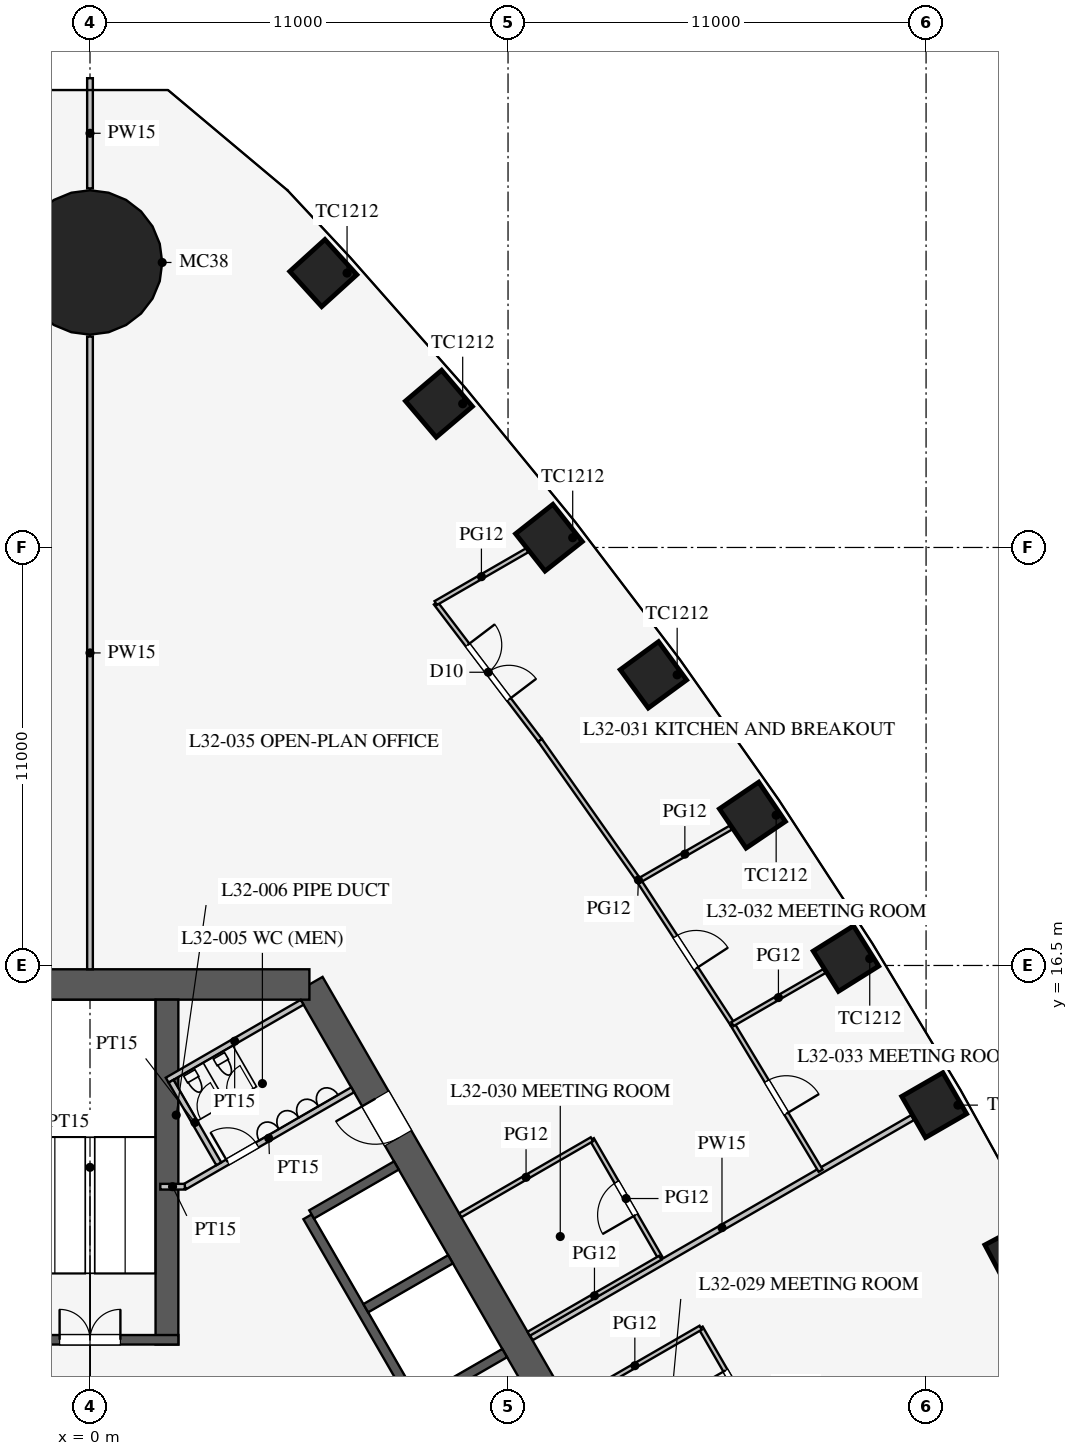
"""IFC4 building model, lengths in metres.
Left out: names, types, materials, properties, quantities, classifications, styles, units other than length and angle.
Written with IfcOpenShell. Run it as: python <this file> out.ifc"""

import sys

from ifc_helpers import new_model, si_unit, direction, frame, frame_2d, origin, origin_2d, place, context, subcontext, project, spatial, rectangle, circle, extrude, element, fill, save


model = new_model("IFC4")
c1 = context("Model", 3, precision=1e-05, world=origin(), true_north=direction((0.0, 1.0)))
c2 = subcontext(c1, "Body", "Model", "MODEL_VIEW")
j1 = project(units=[si_unit("LENGTHUNIT", "METRE"), si_unit("PLANEANGLEUNIT", "RADIAN")], contexts=[c1])
p1 = place(None, origin())
s1 = spatial("IfcSite", under=j1, at=p1, CompositionType="ELEMENT")
p2 = place(p1, origin())
s2 = spatial("IfcBuilding", under=s1, at=p2, CompositionType="ELEMENT")
p3 = place(p2, frame((0.0, 0.0, 140.9)))
s3 = spatial("IfcBuildingStorey", under=s2, at=p3, CompositionType="ELEMENT", Elevation=140.9)
for number, where, z_axis, x_axis in (
    (1, (24.393, 8.887, 0.0), (0.0, 0.0, 1.0), (-0.468, 0.883, 0.0)),
    (2, (22.213, 12.825, 0.0), (0.0, 0.0, 1.0), (-0.5, 0.866, 0.0)),
    (3, (19.893, 16.681, 0.0), (0.0, 0.0, 1.0), (-0.531, 0.847, 0.0)),
    (4, (17.43, 20.456, 0.0), (0.0, 0.0, 1.0), (-0.561, 0.828, 0.0)),
    (5, (14.825, 24.148, 0.0), (0.0, 0.0, 1.0), (-0.591, 0.807, 0.0)),
    (6, (12.077, 27.757, 0.0), (0.0, 0.0, 1.0), (-0.62, 0.785, 0.0)),
    (7, (9.182, 31.282, 0.0), (0.0, 0.0, 1.0), (-0.648, 0.762, 0.0)),
    (8, (6.139, 34.721, 0.0), (0.0, 0.0, 1.0), (-0.672, 0.74, 0.0)),
):
    element("IfcColumn", number, at=place(p3, frame(where, z_axis=z_axis, x_axis=x_axis)), inside=s3, PredefinedType="COLUMN", context=c2, shape_type="SweptSolid", body=[
        extrude(rectangle(XDim=1.25, YDim=1.25, at=origin_2d()), origin(), (0.0, 0.0, 1.0), 4.2),
    ])
p4 = place(p3, frame((0.0, 35.0, 0.0), z_axis=(0.0, 0.0, 1.0), x_axis=(1.0, 0.0, 0.0)))
e9 = element("IfcColumn", 9, at=p4, inside=s3, PredefinedType="COLUMN", context=c2, shape_type="SweptSolid", body=[
    extrude(circle(Radius=1.9, at=origin_2d()), origin(), (0.0, 0.0, 1.0), 4.2),
])
p5 = place(p3, frame((16.743, -3.0, 0.0), z_axis=(0.0, 0.0, 1.0), x_axis=(-0.500002442456, 0.866023993627, 0.0)))
e10 = element("IfcWall", 10, at=p5, inside=s3, PredefinedType="SHEAR", context=c2, shape_type="SweptSolid", body=[
    extrude(rectangle(XDim=21.939, YDim=0.8, at=frame_2d((10.97, 0.0))), origin(), (0.0, 0.0, 1.0), 4.2),
])
p6 = place(p5, frame((17.27, 0.0, 0.0)))
e11 = element("IfcOpeningElement", 11, at=p6, cuts=e10, PredefinedType="OPENING", context=c2, shape_type="SweptSolid", body=[
    extrude(rectangle(XDim=1.2, YDim=2.1, at=frame_2d((0.6, 1.05))), frame((0.0, 0.41, 0.0), z_axis=(0.0, -1.0, 0.0), x_axis=(1.0, 0.0, 0.0)), (0.0, 0.0, 1.0), 0.82),
])
p7 = place(p5, frame((3.47, 0.0, 0.0)))
e12 = element("IfcOpeningElement", 12, at=p7, cuts=e10, PredefinedType="OPENING", context=c2, shape_type="SweptSolid", body=[
    extrude(rectangle(XDim=1.2, YDim=2.1, at=frame_2d((0.6, 1.05))), frame((0.0, 0.41, 0.0), z_axis=(0.0, -1.0, 0.0), x_axis=(1.0, 0.0, 0.0)), (0.0, 0.0, 1.0), 0.82),
])
p8 = place(p3, frame((5.773, 16.0, 0.0), z_axis=(0.0, 0.0, 1.0), x_axis=(-1.0, 0.0, 0.0)))
e13 = element("IfcWall", 13, at=p8, inside=s3, PredefinedType="SHEAR", context=c2, shape_type="SweptSolid", body=[
    extrude(rectangle(XDim=11.547, YDim=0.8, at=frame_2d((5.773, 0.0))), origin(), (0.0, 0.0, 1.0), 4.2),
])
p9 = place(p3, frame((11.424, 0.014, 0.0), z_axis=(0.0, 0.0, 1.0), x_axis=(-0.500001763848, 0.866024385424, 0.0)))
e14 = element("IfcWall", 14, at=p9, inside=s3, PredefinedType="SHEAR", context=c2, shape_type="SweptSolid", body=[
    extrude(rectangle(XDim=11.4, YDim=0.25, at=frame_2d((5.7, 0.0))), origin(), (0.0, 0.0, 1.0), 4.2),
])
p10 = place(p9, frame((0.975, 0.0, 0.0)))
e15 = element("IfcOpeningElement", 15, at=p10, cuts=e14, PredefinedType="OPENING", context=c2, shape_type="SweptSolid", body=[
    extrude(rectangle(XDim=0.9, YDim=2.1, at=frame_2d((0.45, 1.05))), frame((0.0, 0.135, 0.0), z_axis=(0.0, -1.0, 0.0), x_axis=(1.0, 0.0, 0.0)), (0.0, 0.0, 1.0), 0.27),
])
p11 = place(p9, frame((3.825, 0.0, 0.0)))
e16 = element("IfcOpeningElement", 16, at=p11, cuts=e14, PredefinedType="OPENING", context=c2, shape_type="SweptSolid", body=[
    extrude(rectangle(XDim=0.9, YDim=2.1, at=frame_2d((0.45, 1.05))), frame((0.0, 0.135, 0.0), z_axis=(0.0, -1.0, 0.0), x_axis=(1.0, 0.0, 0.0)), (0.0, 0.0, 1.0), 0.27),
])
for number, where, z_axis, x_axis in (
    (17, (8.682, 5.012, 0.0), (0.0, 0.0, 1.0), (0.866, 0.5, 0.0)),
    (18, (7.257, 7.481, 0.0), (0.0, 0.0, 1.0), (0.866, 0.5, 0.0)),
):
    element("IfcWall", number, at=place(p3, frame(where, z_axis=z_axis, x_axis=x_axis)), inside=s3, PredefinedType="SHEAR", context=c2, shape_type="SweptSolid", body=[
        extrude(rectangle(XDim=2.575, YDim=0.25, at=frame_2d((1.288, 0.0))), origin(), (0.0, 0.0, 1.0), 4.2),
    ])
p12 = place(p3, frame((5.832, 9.949, 0.0), z_axis=(0.0, 0.0, 1.0), x_axis=(0.866029291668, 0.499993265928, 0.0)))
e19 = element("IfcWall", 19, at=p12, inside=s3, PredefinedType="SHEAR", context=c2, shape_type="SweptSolid", body=[
    extrude(rectangle(XDim=2.575, YDim=0.25, at=frame_2d((1.288, 0.0))), origin(), (0.0, 0.0, 1.0), 4.2),
])
p13 = place(p3, frame((2.025, 6.525, 0.0), z_axis=(0.0, 0.0, 1.0), x_axis=(0.0, 1.0, 0.0)))
e20 = element("IfcWall", 20, at=p13, inside=s3, PredefinedType="SHEAR", context=c2, shape_type="SweptSolid", body=[
    extrude(rectangle(XDim=9.075, YDim=0.6, at=frame_2d((4.538, 0.0))), origin(), (0.0, 0.0, 1.0), 4.2),
])
p14 = place(p3, frame((2.325, 6.65, 0.0), z_axis=(0.0, 0.0, 1.0), x_axis=(-1.0, 0.0, 0.0)))
e21 = element("IfcWall", 21, at=p14, inside=s3, PredefinedType="SHEAR", context=c2, shape_type="SweptSolid", body=[
    extrude(rectangle(XDim=4.65, YDim=0.25, at=frame_2d((2.325, 0.0))), origin(), (0.0, 0.0, 1.0), 4.2),
])
p15 = place(p14, frame((1.525, 0.0, 0.0)))
e22 = element("IfcOpeningElement", 22, at=p15, cuts=e21, PredefinedType="OPENING", context=c2, shape_type="SweptSolid", body=[
    extrude(rectangle(XDim=1.6, YDim=2.1, at=frame_2d((0.8, 1.05))), frame((0.0, 0.135, 0.0), z_axis=(0.0, -1.0, 0.0), x_axis=(1.0, 0.0, 0.0)), (0.0, 0.0, 1.0), 0.27),
])
p16 = place(p3, frame((2.495, 10.678, 0.0), z_axis=(0.0, 0.0, 1.0), x_axis=(0.86602216432, 0.500005610874, 0.0)))
e23 = element("IfcWall", 23, at=p16, inside=s3, PredefinedType="PARTITIONING", context=c2, shape_type="SweptSolid", body=[
    extrude(rectangle(XDim=5.1, YDim=0.15, at=frame_2d((2.55, 0.0))), origin(), (0.0, 0.0, 1.0), 4.0),
])
p17 = place(p16, frame((1.3, 0.0, 0.0)))
e24 = element("IfcOpeningElement", 24, at=p17, cuts=e23, PredefinedType="OPENING", context=c2, shape_type="SweptSolid", body=[
    extrude(rectangle(XDim=0.9, YDim=2.1, at=frame_2d((0.45, 1.05))), frame((0.0, 0.085, 0.0), z_axis=(0.0, -1.0, 0.0), x_axis=(1.0, 0.0, 0.0)), (0.0, 0.0, 1.0), 0.17),
])
p18 = place(p3, frame((2.495, 10.678, 0.0), z_axis=(0.0, 0.0, 1.0), x_axis=(-1.0, 0.0, 0.0)))
e25 = element("IfcWall", 25, at=p18, inside=s3, PredefinedType="PARTITIONING", context=c2, shape_type="SweptSolid", body=[
    extrude(rectangle(XDim=0.645, YDim=0.15, at=frame_2d((0.323, 0.0))), origin(), (0.0, 0.0, 1.0), 4.0),
])
p19 = place(p3, frame((2.031, 13.482, 0.0), z_axis=(0.0, 0.0, 1.0), x_axis=(0.866050731258, 0.499956128963, 0.0)))
e26 = element("IfcWall", 26, at=p19, inside=s3, PredefinedType="PARTITIONING", context=c2, shape_type="SweptSolid", body=[
    extrude(rectangle(XDim=4.1, YDim=0.15, at=frame_2d((2.05, 0.0))), origin(), (0.0, 0.0, 1.0), 4.0),
])
p20 = place(p3, frame((3.389, 11.281, 0.0), z_axis=(0.0, 0.0, 1.0), x_axis=(-0.499989096993, 0.866031698547, 0.0)))
e27 = element("IfcWall", 27, at=p20, inside=s3, PredefinedType="PARTITIONING", context=c2, shape_type="SweptSolid", body=[
    extrude(rectangle(XDim=2.51, YDim=0.15, at=frame_2d((1.255, 0.0))), origin(), (0.0, 0.0, 1.0), 4.0),
])
p21 = place(p3, frame((0.0, 16.4, 0.0), z_axis=(0.0, 0.0, 1.0), x_axis=(0.0, 1.0, 0.0)))
e28 = element("IfcWall", 28, at=p21, inside=s3, PredefinedType="PARTITIONING", context=c2, shape_type="SweptSolid", body=[
    extrude(rectangle(XDim=16.65, YDim=0.15, at=frame_2d((8.325, 0.0))), origin(), (0.0, 0.0, 1.0), 2.3),
])
p22 = place(p3, frame((0.0, 36.95, 0.0), z_axis=(0.0, 0.0, 1.0), x_axis=(0.0, 1.0, 0.0)))
e29 = element("IfcWall", 29, at=p22, inside=s3, PredefinedType="PARTITIONING", context=c2, shape_type="SweptSolid", body=[
    extrude(rectangle(XDim=2.899, YDim=0.15, at=frame_2d((1.45, 0.0))), origin(), (0.0, 0.0, 1.0), 2.3),
])
p23 = place(p3, frame((11.613, 6.705, 0.0), z_axis=(0.0, 0.0, 1.0), x_axis=(0.866031170684, 0.499990011303, 0.0)))
e30 = element("IfcWall", 30, at=p23, inside=s3, PredefinedType="PARTITIONING", context=c2, shape_type="SweptSolid", body=[
    extrude(rectangle(XDim=11.585, YDim=0.15, at=frame_2d((5.792, 0.0))), origin(), (0.0, 0.0, 1.0), 3.2),
])
p24 = place(p3, frame((15.006, 8.808, 0.0), z_axis=(0.0, 0.0, 1.0), x_axis=(-0.500012057535, 0.866018442252, 0.0)))
e31 = element("IfcWall", 31, at=p24, inside=s3, PredefinedType="PARTITIONING", context=c2, shape_type="SweptSolid", body=[
    extrude(rectangle(XDim=3.6, YDim=0.12, at=frame_2d((1.8, 0.0))), origin(), (0.0, 0.0, 1.0), 2.9),
])
p25 = place(p24, frame((1.3, 0.0, 0.15)))
e32 = element("IfcOpeningElement", 32, at=p25, cuts=e31, PredefinedType="OPENING", context=c2, shape_type="SweptSolid", body=[
    extrude(rectangle(XDim=1.0, YDim=2.1, at=frame_2d((0.5, 1.05))), frame((0.0, 0.07, 0.0), z_axis=(0.0, -1.0, 0.0), x_axis=(1.0, 0.0, 0.0)), (0.0, 0.0, 1.0), 0.14),
])
p26 = place(p3, frame((17.869, 3.85, 0.0), z_axis=(0.0, 0.0, 1.0), x_axis=(-0.500012057535, 0.866018442252, 0.0)))
e33 = element("IfcWall", 33, at=p26, inside=s3, PredefinedType="PARTITIONING", context=c2, shape_type="SweptSolid", body=[
    extrude(rectangle(XDim=3.6, YDim=0.12, at=frame_2d((1.8, 0.0))), origin(), (0.0, 0.0, 1.0), 2.9),
])
p27 = place(p26, frame((1.3, 0.0, 0.15)))
e34 = element("IfcOpeningElement", 34, at=p27, cuts=e33, PredefinedType="OPENING", context=c2, shape_type="SweptSolid", body=[
    extrude(rectangle(XDim=1.0, YDim=2.1, at=frame_2d((0.5, 1.05))), frame((0.0, 0.07, 0.0), z_axis=(0.0, -1.0, 0.0), x_axis=(1.0, 0.0, 0.0)), (0.0, 0.0, 1.0), 0.14),
])
for number, where, z_axis, x_axis in (
    (35, (11.542, 6.808, 0.0), (0.0, 0.0, 1.0), (0.866, 0.5, 0.0)),
    (36, (9.742, 9.926, 0.0), (0.0, 0.0, 1.0), (0.866, 0.5, 0.0)),
    (37, (12.605, 4.968, 0.0), (0.0, 0.0, 1.0), (0.866, 0.5, 0.0)),
):
    element("IfcWall", number, at=place(p3, frame(where, z_axis=z_axis, x_axis=x_axis)), inside=s3, PredefinedType="PARTITIONING", context=c2, shape_type="SweptSolid", body=[
        extrude(rectangle(XDim=4.0, YDim=0.12, at=frame_2d((2.0, 0.0))), origin(), (0.0, 0.0, 1.0), 2.9),
    ])
p28 = place(p3, frame((19.226, 11.1, 0.0), z_axis=(0.0, 0.0, 1.0), x_axis=(-0.515548366618, 0.856860479703, 0.0)))
e38 = element("IfcWall", 38, at=p28, inside=s3, PredefinedType="PARTITIONING", context=c2, shape_type="SweptSolid", body=[
    extrude(rectangle(XDim=4.501, YDim=0.12, at=frame_2d((2.25, 0.0))), origin(), (0.0, 0.0, 1.0), 2.9),
])
p29 = place(p28, frame((1.75, 0.0, 0.15)))
e39 = element("IfcOpeningElement", 39, at=p29, cuts=e38, PredefinedType="OPENING", context=c2, shape_type="SweptSolid", body=[
    extrude(rectangle(XDim=1.0, YDim=2.1, at=frame_2d((0.5, 1.05))), frame((0.0, 0.07, 0.0), z_axis=(0.0, -1.0, 0.0), x_axis=(1.0, 0.0, 0.0)), (0.0, 0.0, 1.0), 0.14),
])
p30 = place(p3, frame((11.842, 22.425, 0.0), z_axis=(0.0, 0.0, 1.0), x_axis=(-0.605240194184, 0.796042905467, 0.0)))
e40 = element("IfcWall", 40, at=p30, inside=s3, PredefinedType="PARTITIONING", context=c2, shape_type="SweptSolid", body=[
    extrude(rectangle(XDim=4.536, YDim=0.12, at=frame_2d((2.268, 0.0))), origin(), (0.0, 0.0, 1.0), 2.9),
])
p31 = place(p30, frame((1.35, 0.0, 0.15)))
e41 = element("IfcOpeningElement", 41, at=p31, cuts=e40, PredefinedType="OPENING", context=c2, shape_type="SweptSolid", body=[
    extrude(rectangle(XDim=1.8, YDim=2.1, at=frame_2d((0.9, 1.05))), frame((0.0, 0.07, 0.0), z_axis=(0.0, -1.0, 0.0), x_axis=(1.0, 0.0, 0.0)), (0.0, 0.0, 1.0), 0.14),
])
p32 = place(p3, frame((16.905, 14.956, 0.0), z_axis=(0.0, 0.0, 1.0), x_axis=(-0.546069464151, 0.837739900161, 0.0)))
e42 = element("IfcWall", 42, at=p32, inside=s3, PredefinedType="PARTITIONING", context=c2, shape_type="SweptSolid", body=[
    extrude(rectangle(XDim=4.507, YDim=0.12, at=frame_2d((2.253, 0.0))), origin(), (0.0, 0.0, 1.0), 2.9),
])
p33 = place(p32, frame((1.75, 0.0, 0.15)))
e43 = element("IfcOpeningElement", 43, at=p33, cuts=e42, PredefinedType="OPENING", context=c2, shape_type="SweptSolid", body=[
    extrude(rectangle(XDim=1.0, YDim=2.1, at=frame_2d((0.5, 1.05))), frame((0.0, 0.07, 0.0), z_axis=(0.0, -1.0, 0.0), x_axis=(1.0, 0.0, 0.0)), (0.0, 0.0, 1.0), 0.14),
])
p34 = place(p3, frame((14.444, 18.732, 0.0), z_axis=(0.0, 0.0, 1.0), x_axis=(-0.576023283708, 0.817433285734, 0.0)))
e44 = element("IfcWall", 44, at=p34, inside=s3, PredefinedType="PARTITIONING", context=c2, shape_type="SweptSolid", body=[
    extrude(rectangle(XDim=4.519, YDim=0.12, at=frame_2d((2.259, 0.0))), origin(), (0.0, 0.0, 1.0), 2.9),
])
p35 = place(p3, frame((9.096, 26.036, 0.0), z_axis=(0.0, 0.0, 1.0), x_axis=(0.866012991964, 0.500021497287, 0.0)))
e45 = element("IfcWall", 45, at=p35, inside=s3, PredefinedType="PARTITIONING", context=c2, shape_type="SweptSolid", body=[
    extrude(rectangle(XDim=2.78, YDim=0.12, at=frame_2d((1.39, 0.0))), origin(), (0.0, 0.0, 1.0), 2.9),
])
p36 = place(p3, frame((16.905, 14.956, 0.0), z_axis=(0.0, 0.0, 1.0), x_axis=(0.865992050729, 0.500057764738, 0.0)))
e46 = element("IfcWall", 46, at=p36, inside=s3, PredefinedType="PARTITIONING", context=c2, shape_type="SweptSolid", body=[
    extrude(rectangle(XDim=2.794, YDim=0.12, at=frame_2d((1.397, 0.0))), origin(), (0.0, 0.0, 1.0), 2.9),
])
p37 = place(p3, frame((14.444, 18.732, 0.0), z_axis=(0.0, 0.0, 1.0), x_axis=(0.866038471125, 0.499977366019, 0.0)))
e47 = element("IfcWall", 47, at=p37, inside=s3, PredefinedType="PARTITIONING", context=c2, shape_type="SweptSolid", body=[
    extrude(rectangle(XDim=2.791, YDim=0.12, at=frame_2d((1.396, 0.0))), origin(), (0.0, 0.0, 1.0), 2.9),
])
p38 = place(p17, origin())
e48 = element("IfcDoor", 48, at=p38, inside=s3, OperationType="SINGLE_SWING_LEFT", PredefinedType="DOOR", context=c2, shape_type="SweptSolid", body=[
    extrude(rectangle(XDim=0.9, YDim=2.1, at=frame_2d((0.45, 1.05))), frame((0.0, 0.025, 0.0), z_axis=(0.0, -1.0, 0.0), x_axis=(1.0, 0.0, 0.0)), (0.0, 0.0, 1.0), 0.05),
])
fill(e24, e48)
p39 = place(p15, frame((1.6, 0.0, 0.0), z_axis=(0.0, 0.0, 1.0), x_axis=(-1.0, 0.0, 0.0)))
e49 = element("IfcDoor", 49, at=p39, inside=s3, OperationType="DOUBLE_DOOR_SINGLE_SWING", PredefinedType="DOOR", context=c2, shape_type="SweptSolid", body=[
    extrude(rectangle(XDim=1.6, YDim=2.1, at=frame_2d((0.8, 1.05))), frame((0.0, 0.025, 0.0), z_axis=(0.0, -1.0, 0.0), x_axis=(1.0, 0.0, 0.0)), (0.0, 0.0, 1.0), 0.05),
])
fill(e22, e49)
p40 = place(p6, origin())
e50 = element("IfcDoor", 50, at=p40, inside=s3, OperationType="SINGLE_SWING_RIGHT", PredefinedType="DOOR", context=c2, shape_type="SweptSolid", body=[
    extrude(rectangle(XDim=1.2, YDim=2.1, at=frame_2d((0.6, 1.05))), frame((0.0, 0.025, 0.0), z_axis=(0.0, -1.0, 0.0), x_axis=(1.0, 0.0, 0.0)), (0.0, 0.0, 1.0), 0.05),
])
fill(e11, e50)
p41 = place(p27, origin())
e51 = element("IfcDoor", 51, at=p41, inside=s3, OperationType="SINGLE_SWING_RIGHT", PredefinedType="DOOR", context=c2, shape_type="SweptSolid", body=[
    extrude(rectangle(XDim=1.0, YDim=2.1, at=frame_2d((0.5, 1.05))), frame((0.0, 0.025, 0.0), z_axis=(0.0, -1.0, 0.0), x_axis=(1.0, 0.0, 0.0)), (0.0, 0.0, 1.0), 0.05),
])
fill(e34, e51)
p42 = place(p25, origin())
e52 = element("IfcDoor", 52, at=p42, inside=s3, OperationType="SINGLE_SWING_LEFT", PredefinedType="DOOR", context=c2, shape_type="SweptSolid", body=[
    extrude(rectangle(XDim=1.0, YDim=2.1, at=frame_2d((0.5, 1.05))), frame((0.0, 0.025, 0.0), z_axis=(0.0, -1.0, 0.0), x_axis=(1.0, 0.0, 0.0)), (0.0, 0.0, 1.0), 0.05),
])
fill(e32, e52)
p43 = place(p31, frame((1.8, 0.0, 0.0), z_axis=(0.0, 0.0, 1.0), x_axis=(-1.0, 0.0, 0.0)))
e53 = element("IfcDoor", 53, at=p43, inside=s3, OperationType="DOUBLE_DOOR_SINGLE_SWING", PredefinedType="DOOR", context=c2, shape_type="SweptSolid", body=[
    extrude(rectangle(XDim=1.8, YDim=2.1, at=frame_2d((0.9, 1.05))), frame((0.0, 0.025, 0.0), z_axis=(0.0, -1.0, 0.0), x_axis=(1.0, 0.0, 0.0)), (0.0, 0.0, 1.0), 0.05),
])
fill(e41, e53)
p44 = place(p33, frame((1.0, 0.0, 0.0), z_axis=(0.0, 0.0, 1.0), x_axis=(-1.0, 0.0, 0.0)))
e54 = element("IfcDoor", 54, at=p44, inside=s3, OperationType="SINGLE_SWING_RIGHT", PredefinedType="DOOR", context=c2, shape_type="SweptSolid", body=[
    extrude(rectangle(XDim=1.0, YDim=2.1, at=frame_2d((0.5, 1.05))), frame((0.0, 0.025, 0.0), z_axis=(0.0, -1.0, 0.0), x_axis=(1.0, 0.0, 0.0)), (0.0, 0.0, 1.0), 0.05),
])
fill(e43, e54)
p45 = place(p29, frame((1.0, 0.0, 0.0), z_axis=(0.0, 0.0, 1.0), x_axis=(-1.0, 0.0, 0.0)))
e55 = element("IfcDoor", 55, at=p45, inside=s3, OperationType="SINGLE_SWING_RIGHT", PredefinedType="DOOR", context=c2, shape_type="SweptSolid", body=[
    extrude(rectangle(XDim=1.0, YDim=2.1, at=frame_2d((0.5, 1.05))), frame((0.0, 0.025, 0.0), z_axis=(0.0, -1.0, 0.0), x_axis=(1.0, 0.0, 0.0)), (0.0, 0.0, 1.0), 0.05),
])
fill(e39, e55)
save(model, sys.argv[1])
